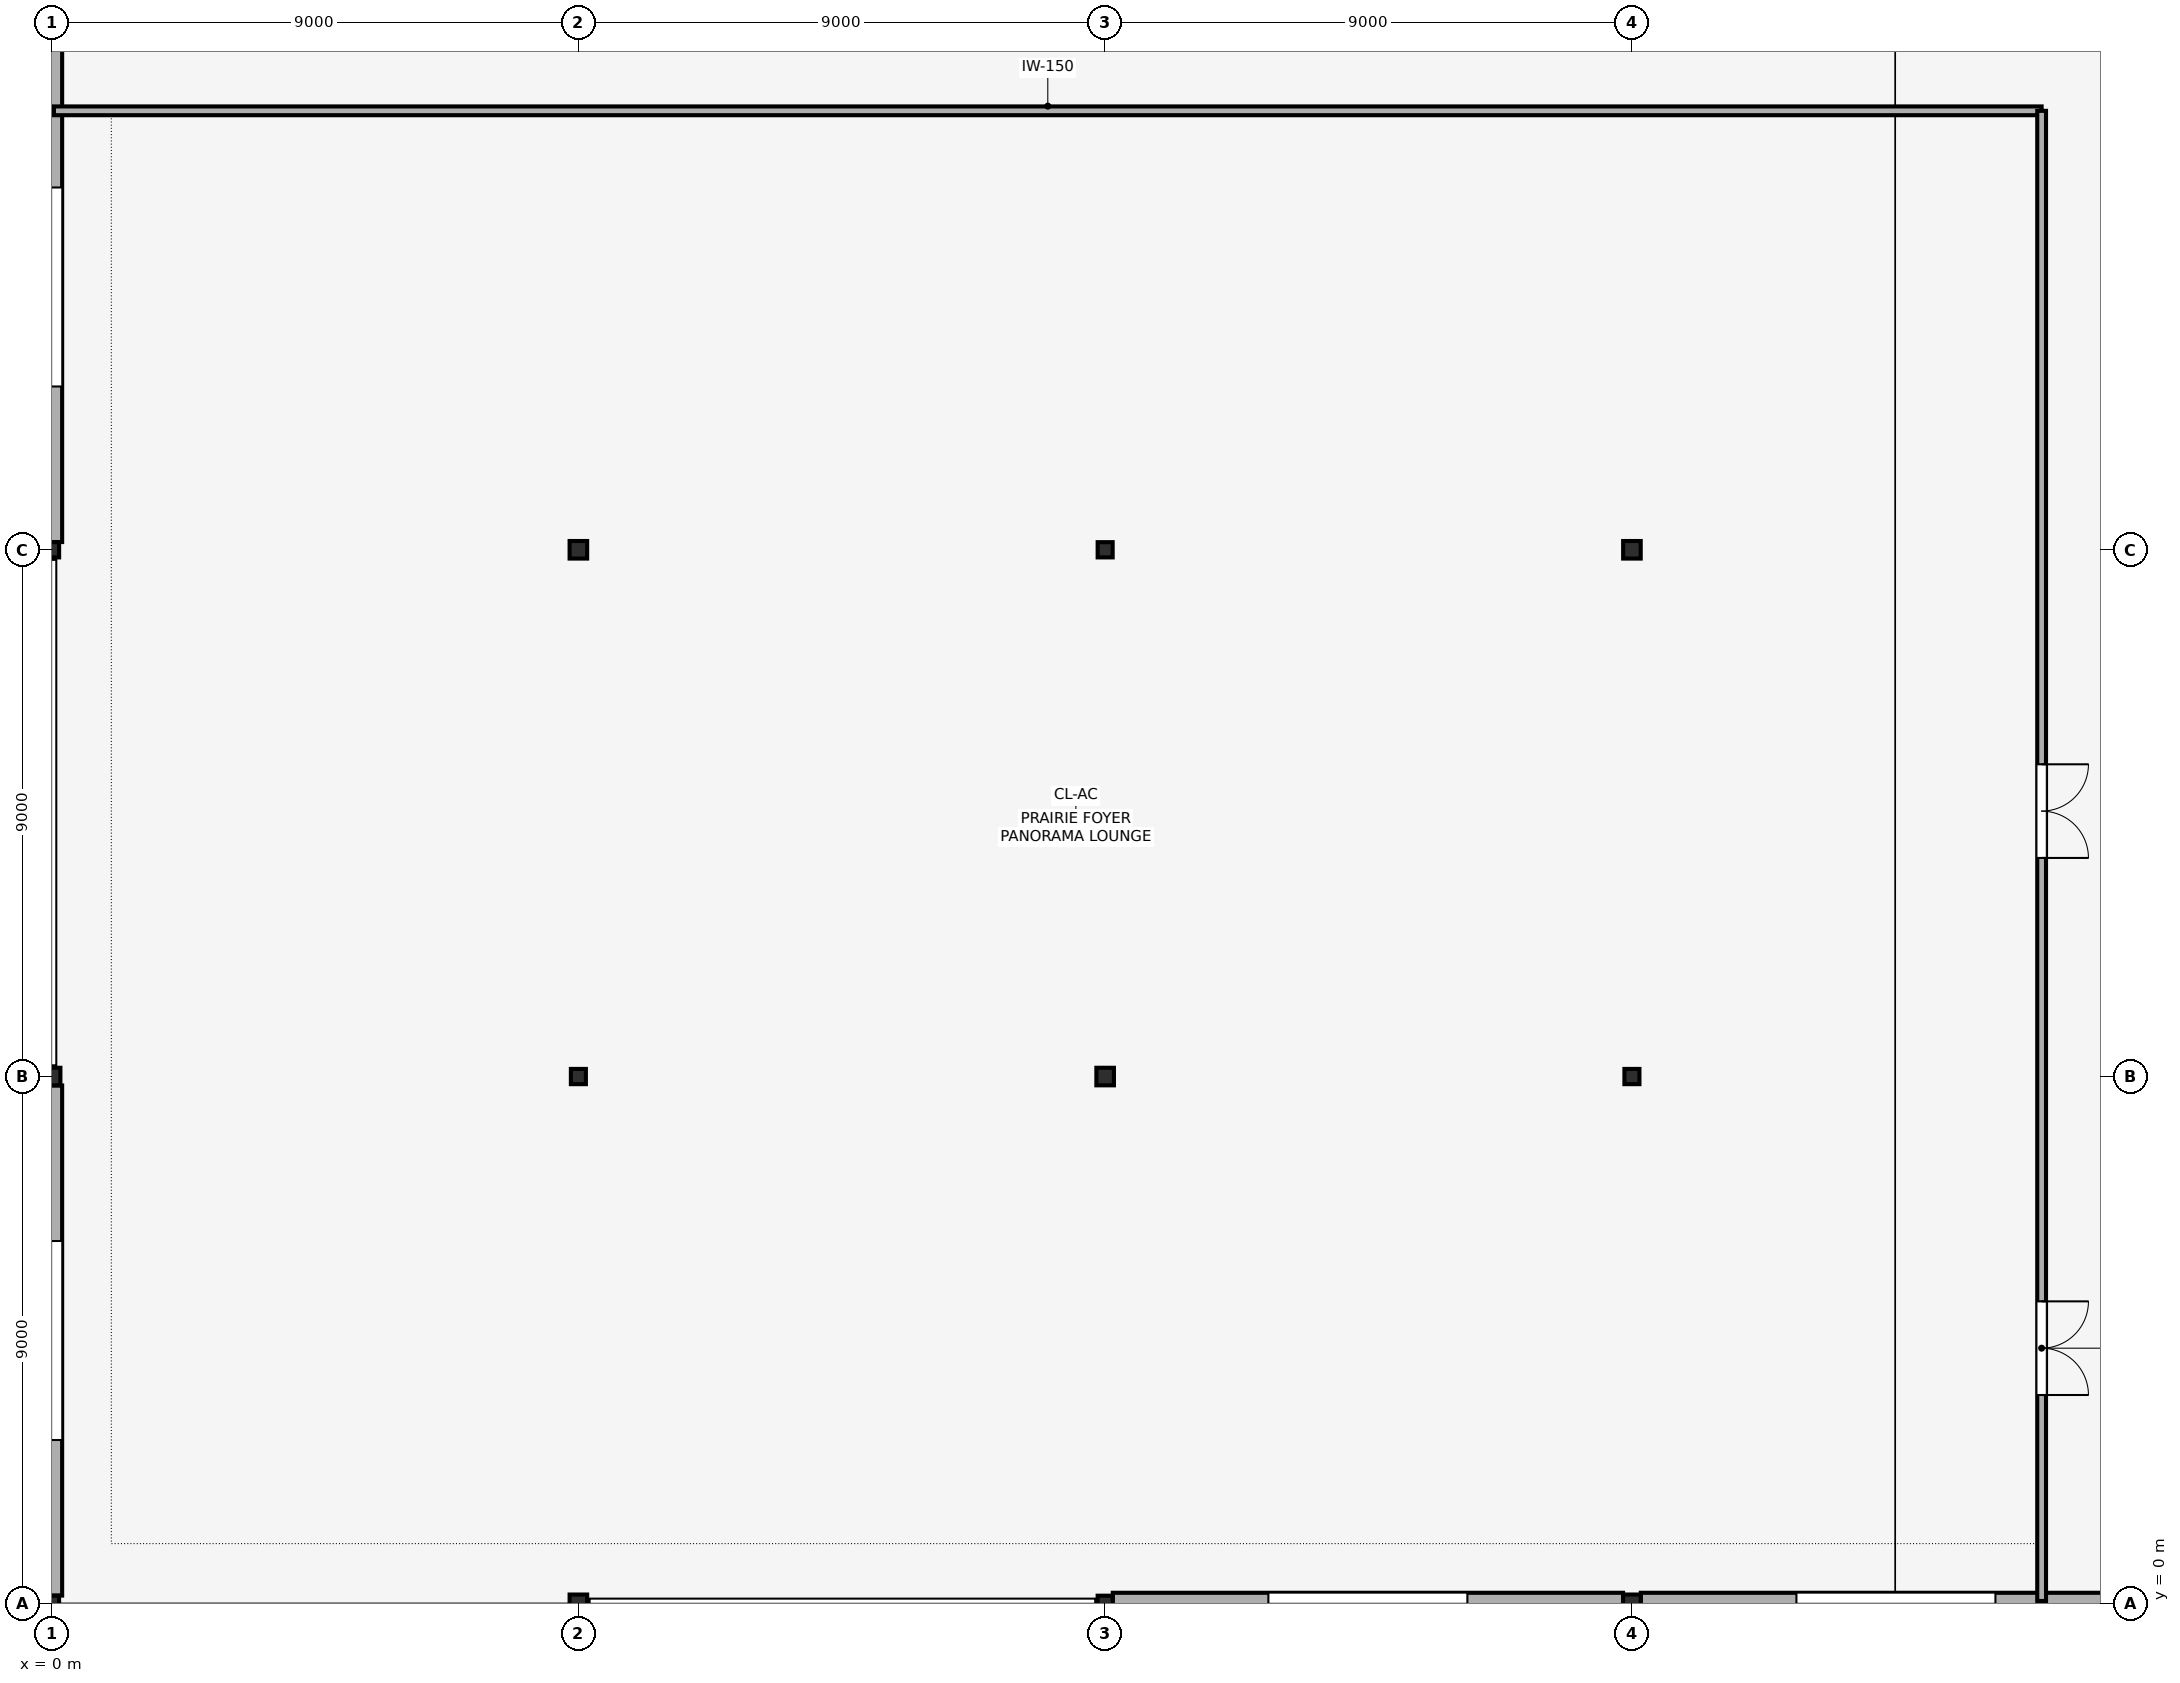
"""IFC4 building model, lengths in metres.
Left out: names, types, materials, properties, quantities, classifications, styles, units other than length and angle.
Written with IfcOpenShell. Run it as: python <this file> out.ifc"""

import sys

from ifc_helpers import new_model, si_unit, direction, frame, frame_2d, origin, origin_with_axes, origin_2d, place, context, subcontext, project, spatial, rectangle, hollow_rectangle, i_section, extrude, element, fill, save


model = new_model("IFC4")
c1 = context("Model", 3, precision=1e-05, world=origin(), true_north=direction((0.0, 1.0)))
c2 = subcontext(c1, "Body", "Model", "MODEL_VIEW")
j1 = project(units=[si_unit("LENGTHUNIT", "METRE"), si_unit("PLANEANGLEUNIT", "RADIAN")], contexts=[c1])
p1 = place(None, origin())
s1 = spatial("IfcSite", under=j1, at=p1, CompositionType="ELEMENT")
p2 = place(p1, origin())
s2 = spatial("IfcBuilding", under=s1, at=p2, CompositionType="ELEMENT")
p3 = place(p2, frame((0.0, 0.0, 10.2)))
s3 = spatial("IfcBuildingStorey", under=s2, at=p3, CompositionType="ELEMENT", Elevation=10.2)
p4 = place(p3, origin_with_axes())
e1 = element("IfcColumn", 1, at=p4, inside=s3, PredefinedType="COLUMN", context=c2, shape_type="SweptSolid", body=[
    extrude(i_section(OverallWidth=0.256, OverallDepth=0.26, WebThickness=0.01, FlangeThickness=0.017, FilletRadius=0.013, at=origin_2d()), origin(), (0.0, 0.0, 1.0), 4.8),
])
p5 = place(p3, frame((0.0, 9.0, 0.0), z_axis=(0.0, 0.0, 1.0), x_axis=(1.0, 0.0, 0.0)))
e2 = element("IfcColumn", 2, at=p5, inside=s3, PredefinedType="COLUMN", context=c2, shape_type="SweptSolid", body=[
    extrude(hollow_rectangle(XDim=0.3, YDim=0.3, WallThickness=0.012, at=origin_2d()), origin(), (0.0, 0.0, 1.0), 4.8),
])
p6 = place(p3, frame((0.0, 18.0, 0.0), z_axis=(0.0, 0.0, 1.0), x_axis=(1.0, 0.0, 0.0)))
e3 = element("IfcColumn", 3, at=p6, inside=s3, PredefinedType="COLUMN", context=c2, shape_type="SweptSolid", body=[
    extrude(i_section(OverallWidth=0.256, OverallDepth=0.26, WebThickness=0.01, FlangeThickness=0.017, FilletRadius=0.013, at=origin_2d()), origin(), (0.0, 0.0, 1.0), 4.8),
])
p7 = place(p3, frame((9.0, 0.0, 0.0), z_axis=(0.0, 0.0, 1.0), x_axis=(1.0, 0.0, 0.0)))
e4 = element("IfcColumn", 4, at=p7, inside=s3, PredefinedType="COLUMN", context=c2, shape_type="SweptSolid", body=[
    extrude(hollow_rectangle(XDim=0.3, YDim=0.3, WallThickness=0.012, at=origin_2d()), origin(), (0.0, 0.0, 1.0), 4.8),
])
p8 = place(p3, frame((9.0, 9.0, 0.0), z_axis=(0.0, 0.0, 1.0), x_axis=(1.0, 0.0, 0.0)))
e5 = element("IfcColumn", 5, at=p8, inside=s3, PredefinedType="COLUMN", context=c2, shape_type="SweptSolid", body=[
    extrude(i_section(OverallWidth=0.256, OverallDepth=0.26, WebThickness=0.01, FlangeThickness=0.017, FilletRadius=0.013, at=origin_2d()), origin(), (0.0, 0.0, 1.0), 4.8),
])
p9 = place(p3, frame((9.0, 18.0, 0.0), z_axis=(0.0, 0.0, 1.0), x_axis=(1.0, 0.0, 0.0)))
e6 = element("IfcColumn", 6, at=p9, inside=s3, PredefinedType="COLUMN", context=c2, shape_type="SweptSolid", body=[
    extrude(hollow_rectangle(XDim=0.3, YDim=0.3, WallThickness=0.012, at=origin_2d()), origin(), (0.0, 0.0, 1.0), 4.8),
])
p10 = place(p3, frame((18.0, 0.0, 0.0), z_axis=(0.0, 0.0, 1.0), x_axis=(1.0, 0.0, 0.0)))
e7 = element("IfcColumn", 7, at=p10, inside=s3, PredefinedType="COLUMN", context=c2, shape_type="SweptSolid", body=[
    extrude(i_section(OverallWidth=0.256, OverallDepth=0.26, WebThickness=0.01, FlangeThickness=0.017, FilletRadius=0.013, at=origin_2d()), origin(), (0.0, 0.0, 1.0), 4.8),
])
p11 = place(p3, frame((18.0, 9.0, 0.0), z_axis=(0.0, 0.0, 1.0), x_axis=(1.0, 0.0, 0.0)))
e8 = element("IfcColumn", 8, at=p11, inside=s3, PredefinedType="COLUMN", context=c2, shape_type="SweptSolid", body=[
    extrude(hollow_rectangle(XDim=0.3, YDim=0.3, WallThickness=0.012, at=origin_2d()), origin(), (0.0, 0.0, 1.0), 4.8),
])
p12 = place(p3, frame((18.0, 18.0, 0.0), z_axis=(0.0, 0.0, 1.0), x_axis=(1.0, 0.0, 0.0)))
e9 = element("IfcColumn", 9, at=p12, inside=s3, PredefinedType="COLUMN", context=c2, shape_type="SweptSolid", body=[
    extrude(i_section(OverallWidth=0.256, OverallDepth=0.26, WebThickness=0.01, FlangeThickness=0.017, FilletRadius=0.013, at=origin_2d()), origin(), (0.0, 0.0, 1.0), 4.8),
])
p13 = place(p3, frame((27.0, 0.0, 0.0), z_axis=(0.0, 0.0, 1.0), x_axis=(1.0, 0.0, 0.0)))
e10 = element("IfcColumn", 10, at=p13, inside=s3, PredefinedType="COLUMN", context=c2, shape_type="SweptSolid", body=[
    extrude(hollow_rectangle(XDim=0.3, YDim=0.3, WallThickness=0.012, at=origin_2d()), origin(), (0.0, 0.0, 1.0), 4.8),
])
p14 = place(p3, frame((27.0, 9.0, 0.0), z_axis=(0.0, 0.0, 1.0), x_axis=(1.0, 0.0, 0.0)))
e11 = element("IfcColumn", 11, at=p14, inside=s3, PredefinedType="COLUMN", context=c2, shape_type="SweptSolid", body=[
    extrude(i_section(OverallWidth=0.256, OverallDepth=0.26, WebThickness=0.01, FlangeThickness=0.017, FilletRadius=0.013, at=origin_2d()), origin(), (0.0, 0.0, 1.0), 4.8),
])
p15 = place(p3, frame((27.0, 18.0, 0.0), z_axis=(0.0, 0.0, 1.0), x_axis=(1.0, 0.0, 0.0)))
e12 = element("IfcColumn", 12, at=p15, inside=s3, PredefinedType="COLUMN", context=c2, shape_type="SweptSolid", body=[
    extrude(hollow_rectangle(XDim=0.3, YDim=0.3, WallThickness=0.012, at=origin_2d()), origin(), (0.0, 0.0, 1.0), 4.8),
])
p16 = place(p3, frame((35.87, 0.0, 0.0), z_axis=(0.0, 0.0, 1.0), x_axis=(-1.0, 0.0, 0.0)))
e13 = element("IfcWall", 13, at=p16, inside=s3, PredefinedType="STANDARD", context=c2, shape_type="SweptSolid", body=[
    extrude(rectangle(XDim=8.718, YDim=0.36, at=frame_2d((4.359, 0.0))), origin(), (0.0, 0.0, 1.0), 3.907),
])
p17 = place(p16, frame((2.659, 0.0, 0.9)))
e14 = element("IfcOpeningElement", 14, at=p17, cuts=e13, PredefinedType="OPENING", context=c2, shape_type="SweptSolid", body=[
    extrude(rectangle(XDim=3.4, YDim=2.0, at=frame_2d((1.7, 1.0))), frame((0.0, 0.19, 0.0), z_axis=(0.0, -1.0, 0.0), x_axis=(1.0, 0.0, 0.0)), (0.0, 0.0, 1.0), 0.38),
])
p18 = place(p3, frame((26.848, 0.0, 0.0), z_axis=(0.0, 0.0, 1.0), x_axis=(-1.0, 0.0, 0.0)))
e15 = element("IfcWall", 15, at=p18, inside=s3, PredefinedType="STANDARD", context=c2, shape_type="SweptSolid", body=[
    extrude(rectangle(XDim=8.718, YDim=0.36, at=frame_2d((4.359, 0.0))), origin(), (0.0, 0.0, 1.0), 3.907),
])
p19 = place(p18, frame((2.659, 0.0, 0.9)))
e16 = element("IfcOpeningElement", 16, at=p19, cuts=e15, PredefinedType="OPENING", context=c2, shape_type="SweptSolid", body=[
    extrude(rectangle(XDim=3.4, YDim=2.0, at=frame_2d((1.7, 1.0))), frame((0.0, 0.19, 0.0), z_axis=(0.0, -1.0, 0.0), x_axis=(1.0, 0.0, 0.0)), (0.0, 0.0, 1.0), 0.38),
])
p20 = place(p3, frame((0.0, 0.132, 0.0), z_axis=(0.0, 0.0, 1.0), x_axis=(0.0, 1.0, 0.0)))
e17 = element("IfcWall", 17, at=p20, inside=s3, PredefinedType="STANDARD", context=c2, shape_type="SweptSolid", body=[
    extrude(rectangle(XDim=8.716, YDim=0.36, at=frame_2d((4.358, 0.0))), origin(), (0.0, 0.0, 1.0), 4.215),
])
p21 = place(p20, frame((2.658, 0.0, 0.9)))
e18 = element("IfcOpeningElement", 18, at=p21, cuts=e17, PredefinedType="OPENING", context=c2, shape_type="SweptSolid", body=[
    extrude(rectangle(XDim=3.4, YDim=2.0, at=frame_2d((1.7, 1.0))), frame((0.0, 0.19, 0.0), z_axis=(0.0, -1.0, 0.0), x_axis=(1.0, 0.0, 0.0)), (0.0, 0.0, 1.0), 0.38),
])
p22 = place(p3, frame((0.0, 18.132, 0.0), z_axis=(0.0, 0.0, 1.0), x_axis=(0.0, 1.0, 0.0)))
e19 = element("IfcWall", 19, at=p22, inside=s3, PredefinedType="STANDARD", context=c2, shape_type="SweptSolid", body=[
    extrude(rectangle(XDim=8.716, YDim=0.36, at=frame_2d((4.358, 0.0))), origin(), (0.0, 0.0, 1.0), 4.215),
])
p23 = place(p22, frame((2.658, 0.0, 0.9)))
e20 = element("IfcOpeningElement", 20, at=p23, cuts=e19, PredefinedType="OPENING", context=c2, shape_type="SweptSolid", body=[
    extrude(rectangle(XDim=3.4, YDim=2.0, at=frame_2d((1.7, 1.0))), frame((0.0, 0.19, 0.0), z_axis=(0.0, -1.0, 0.0), x_axis=(1.0, 0.0, 0.0)), (0.0, 0.0, 1.0), 0.38),
])
p24 = place(p3, frame((0.04, 25.5, 0.0), z_axis=(0.0, 0.0, 1.0), x_axis=(1.0, 0.0, 0.0)))
e21 = element("IfcWall", 21, at=p24, inside=s3, PredefinedType="PARTITIONING", context=c2, shape_type="SweptSolid", body=[
    extrude(rectangle(XDim=33.96, YDim=0.15, at=frame_2d((16.98, 0.0))), origin(), (0.0, 0.0, 1.0), 4.52),
])
p25 = place(p3, frame((34.0, 25.5, 0.0), z_axis=(0.0, 0.0, 1.0), x_axis=(0.0, -1.0, 0.0)))
e22 = element("IfcWall", 22, at=p25, inside=s3, PredefinedType="PARTITIONING", context=c2, shape_type="SweptSolid", body=[
    extrude(rectangle(XDim=25.46, YDim=0.15, at=frame_2d((12.73, 0.0))), origin(), (0.0, 0.0, 1.0), 4.52),
])
p26 = place(p25, frame((20.341, 0.0, 0.0)))
e23 = element("IfcOpeningElement", 23, at=p26, cuts=e22, PredefinedType="OPENING", context=c2, shape_type="SweptSolid", body=[
    extrude(rectangle(XDim=1.6, YDim=2.2, at=frame_2d((0.8, 1.1))), frame((0.0, 0.085, 0.0), z_axis=(0.0, -1.0, 0.0), x_axis=(1.0, 0.0, 0.0)), (0.0, 0.0, 1.0), 0.17),
])
p27 = place(p25, frame((11.165, 0.0, 0.0)))
e24 = element("IfcOpeningElement", 24, at=p27, cuts=e22, PredefinedType="OPENING", context=c2, shape_type="SweptSolid", body=[
    extrude(rectangle(XDim=1.6, YDim=2.2, at=frame_2d((0.8, 1.1))), frame((0.0, 0.085, 0.0), z_axis=(0.0, -1.0, 0.0), x_axis=(1.0, 0.0, 0.0)), (0.0, 0.0, 1.0), 0.17),
])
p28 = place(p17, origin())
e25 = element("IfcWindow", 25, at=p28, inside=s3, PartitioningType="SINGLE_PANEL", PredefinedType="WINDOW", context=c2, shape_type="SweptSolid", body=[
    extrude(rectangle(XDim=3.4, YDim=2.0, at=frame_2d((1.7, 1.0))), frame((0.0, 0.03, 0.0), z_axis=(0.0, -1.0, 0.0), x_axis=(1.0, 0.0, 0.0)), (0.0, 0.0, 1.0), 0.06),
])
fill(e14, e25)
p29 = place(p19, origin())
e26 = element("IfcWindow", 26, at=p29, inside=s3, PartitioningType="SINGLE_PANEL", PredefinedType="WINDOW", context=c2, shape_type="SweptSolid", body=[
    extrude(rectangle(XDim=3.4, YDim=2.0, at=frame_2d((1.7, 1.0))), frame((0.0, 0.03, 0.0), z_axis=(0.0, -1.0, 0.0), x_axis=(1.0, 0.0, 0.0)), (0.0, 0.0, 1.0), 0.06),
])
fill(e16, e26)
p30 = place(p21, origin())
e27 = element("IfcWindow", 27, at=p30, inside=s3, PartitioningType="SINGLE_PANEL", PredefinedType="WINDOW", context=c2, shape_type="SweptSolid", body=[
    extrude(rectangle(XDim=3.4, YDim=2.0, at=frame_2d((1.7, 1.0))), frame((0.0, 0.03, 0.0), z_axis=(0.0, -1.0, 0.0), x_axis=(1.0, 0.0, 0.0)), (0.0, 0.0, 1.0), 0.06),
])
fill(e18, e27)
p31 = place(p23, origin())
e28 = element("IfcWindow", 28, at=p31, inside=s3, PartitioningType="SINGLE_PANEL", PredefinedType="WINDOW", context=c2, shape_type="SweptSolid", body=[
    extrude(rectangle(XDim=3.4, YDim=2.0, at=frame_2d((1.7, 1.0))), frame((0.0, 0.03, 0.0), z_axis=(0.0, -1.0, 0.0), x_axis=(1.0, 0.0, 0.0)), (0.0, 0.0, 1.0), 0.06),
])
fill(e20, e28)
p32 = place(p26, origin())
e29 = element("IfcDoor", 29, at=p32, inside=s3, OperationType="DOUBLE_DOOR_SINGLE_SWING", PredefinedType="DOOR", context=c2, shape_type="SweptSolid", body=[
    extrude(rectangle(XDim=1.6, YDim=2.2, at=frame_2d((0.8, 1.1))), frame((0.0, 0.025, 0.0), z_axis=(0.0, -1.0, 0.0), x_axis=(1.0, 0.0, 0.0)), (0.0, 0.0, 1.0), 0.05),
])
fill(e23, e29)
p33 = place(p27, origin())
e30 = element("IfcDoor", 30, at=p33, inside=s3, OperationType="DOUBLE_DOOR_SINGLE_SWING", PredefinedType="DOOR", context=c2, shape_type="SweptSolid", body=[
    extrude(rectangle(XDim=1.6, YDim=2.2, at=frame_2d((0.8, 1.1))), frame((0.0, 0.025, 0.0), z_axis=(0.0, -1.0, 0.0), x_axis=(1.0, 0.0, 0.0)), (0.0, 0.0, 1.0), 0.05),
])
fill(e24, e30)
save(model, sys.argv[1])
